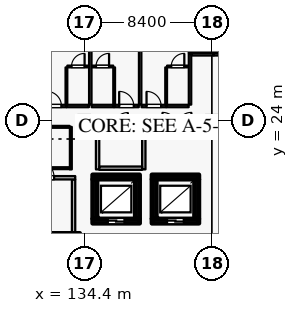
"""IFC4 building model, lengths in metres.
Left out: names, types, materials, properties, quantities, classifications, styles, units other than length and angle.
Written with IfcOpenShell. Run it as: python <this file> out.ifc"""

import sys

from ifc_helpers import new_model, si_unit, direction, frame, frame_2d, origin, origin_2d, place, context, subcontext, project, spatial, rectangle, extrude, element, fill, save


model = new_model("IFC4")
c1 = context("Model", 3, precision=1e-05, world=origin(), true_north=direction((0.0, 1.0)))
c2 = subcontext(c1, "Body", "Model", "MODEL_VIEW")
j1 = project(units=[si_unit("LENGTHUNIT", "METRE"), si_unit("PLANEANGLEUNIT", "RADIAN")], contexts=[c1])
p1 = place(None, origin())
s1 = spatial("IfcSite", under=j1, at=p1, CompositionType="ELEMENT")
p2 = place(p1, origin())
s2 = spatial("IfcBuilding", under=s1, at=p2, CompositionType="ELEMENT")
p3 = place(p2, frame((0.0, 0.0, 39.6)))
s3 = spatial("IfcBuildingStorey", under=s2, at=p3, CompositionType="ELEMENT", Elevation=39.6)
for number, where, z_axis, x_axis in (
    (1, (134.4, 24.0, 0.0), (0.0, 0.0, 1.0), (1.0, 0.0, 0.0)),
    (2, (142.8, 24.0, 0.0), (0.0, 0.0, 1.0), (1.0, 0.0, 0.0)),
):
    element("IfcColumn", number, at=place(p3, frame(where, z_axis=z_axis, x_axis=x_axis)), inside=s3, PredefinedType="COLUMN", context=c2, shape_type="SweptSolid", body=[
        extrude(rectangle(XDim=0.6, YDim=0.6, at=origin_2d()), origin(), (0.0, 0.0, 1.0), 3.6),
    ])
p4 = place(p3, frame((134.95, 17.4, 0.0), z_axis=(0.0, 0.0, 1.0), x_axis=(1.0, 0.0, 0.0)))
e3 = element("IfcWall", 3, at=p4, inside=s3, PredefinedType="SHEAR", context=c2, shape_type="SweptSolid", body=[
    extrude(rectangle(XDim=3.1, YDim=0.3, at=frame_2d((1.55, 0.0))), origin(), (0.0, 0.0, 1.0), 3.335),
])
p5 = place(p4, frame((1.0, 0.0, 0.0)))
e4 = element("IfcOpeningElement", 4, at=p5, cuts=e3, PredefinedType="OPENING", context=c2, shape_type="SweptSolid", body=[
    extrude(rectangle(XDim=1.1, YDim=2.2, at=frame_2d((0.55, 1.1))), frame((0.0, 0.16, 0.0), z_axis=(0.0, -1.0, 0.0), x_axis=(1.0, 0.0, 0.0)), (0.0, 0.0, 1.0), 0.32),
])
p6 = place(p3, frame((137.9, 17.555, 0.0), z_axis=(0.0, 0.0, 1.0), x_axis=(0.0, 1.0, 0.0)))
e5 = element("IfcWall", 5, at=p6, inside=s3, PredefinedType="SHEAR", context=c2, shape_type="SweptSolid", body=[
    extrude(rectangle(XDim=2.59, YDim=0.3, at=frame_2d((1.295, 0.0))), origin(), (0.0, 0.0, 1.0), 3.335),
])
p7 = place(p3, frame((138.05, 20.3, 0.0), z_axis=(0.0, 0.0, 1.0), x_axis=(-1.0, 0.0, 0.0)))
e6 = element("IfcWall", 6, at=p7, inside=s3, PredefinedType="SHEAR", context=c2, shape_type="SweptSolid", body=[
    extrude(rectangle(XDim=3.1, YDim=0.3, at=frame_2d((1.55, 0.0))), origin(), (0.0, 0.0, 1.0), 3.335),
])
p8 = place(p3, frame((135.1, 20.145, 0.0), z_axis=(0.0, 0.0, 1.0), x_axis=(0.0, -1.0, 0.0)))
e7 = element("IfcWall", 7, at=p8, inside=s3, PredefinedType="SHEAR", context=c2, shape_type="SweptSolid", body=[
    extrude(rectangle(XDim=2.59, YDim=0.3, at=frame_2d((1.295, 0.0))), origin(), (0.0, 0.0, 1.0), 3.335),
])
p9 = place(p3, frame((138.85, 17.4, 0.0), z_axis=(0.0, 0.0, 1.0), x_axis=(1.0, 0.0, 0.0)))
e8 = element("IfcWall", 8, at=p9, inside=s3, PredefinedType="SHEAR", context=c2, shape_type="SweptSolid", body=[
    extrude(rectangle(XDim=3.1, YDim=0.3, at=frame_2d((1.55, 0.0))), origin(), (0.0, 0.0, 1.0), 3.335),
])
p10 = place(p9, frame((1.0, 0.0, 0.0)))
e9 = element("IfcOpeningElement", 9, at=p10, cuts=e8, PredefinedType="OPENING", context=c2, shape_type="SweptSolid", body=[
    extrude(rectangle(XDim=1.1, YDim=2.2, at=frame_2d((0.55, 1.1))), frame((0.0, 0.16, 0.0), z_axis=(0.0, -1.0, 0.0), x_axis=(1.0, 0.0, 0.0)), (0.0, 0.0, 1.0), 0.32),
])
p11 = place(p3, frame((141.8, 17.555, 0.0), z_axis=(0.0, 0.0, 1.0), x_axis=(0.0, 1.0, 0.0)))
e10 = element("IfcWall", 10, at=p11, inside=s3, PredefinedType="SHEAR", context=c2, shape_type="SweptSolid", body=[
    extrude(rectangle(XDim=2.59, YDim=0.3, at=frame_2d((1.295, 0.0))), origin(), (0.0, 0.0, 1.0), 3.335),
])
p12 = place(p3, frame((141.95, 20.3, 0.0), z_axis=(0.0, 0.0, 1.0), x_axis=(-1.0, 0.0, 0.0)))
e11 = element("IfcWall", 11, at=p12, inside=s3, PredefinedType="SHEAR", context=c2, shape_type="SweptSolid", body=[
    extrude(rectangle(XDim=3.1, YDim=0.3, at=frame_2d((1.55, 0.0))), origin(), (0.0, 0.0, 1.0), 3.335),
])
p13 = place(p3, frame((139.0, 20.145, 0.0), z_axis=(0.0, 0.0, 1.0), x_axis=(0.0, -1.0, 0.0)))
e12 = element("IfcWall", 12, at=p13, inside=s3, PredefinedType="SHEAR", context=c2, shape_type="SweptSolid", body=[
    extrude(rectangle(XDim=2.59, YDim=0.3, at=frame_2d((1.295, 0.0))), origin(), (0.0, 0.0, 1.0), 3.335),
])
p14 = place(p3, frame((134.11, 16.45, 0.0), z_axis=(0.0, 0.0, 1.0), x_axis=(-1.0, 0.0, 0.0)))
e13 = element("IfcWall", 13, at=p14, inside=s3, PredefinedType="SHEAR", context=c2, shape_type="SweptSolid", body=[
    extrude(rectangle(XDim=4.06, YDim=0.3, at=frame_2d((2.03, 0.0))), origin(), (0.0, 0.0, 1.0), 3.335),
])
p15 = place(p14, frame((1.685, 0.0, 0.0)))
e14 = element("IfcOpeningElement", 14, at=p15, cuts=e13, PredefinedType="OPENING", context=c2, shape_type="SweptSolid", body=[
    extrude(rectangle(XDim=1.25, YDim=2.25, at=frame_2d((0.625, 1.125))), frame((0.0, 0.16, 0.0), z_axis=(0.0, -1.0, 0.0), x_axis=(1.0, 0.0, 0.0)), (0.0, 0.0, 1.0), 0.32),
])
p16 = place(p3, frame((133.7, 16.605, 0.0), z_axis=(0.0, 0.0, 1.0), x_axis=(0.0, 1.0, 0.0)))
e15 = element("IfcWall", 15, at=p16, inside=s3, PredefinedType="PARTITIONING", context=c2, shape_type="SweptSolid", body=[
    extrude(rectangle(XDim=3.53, YDim=0.22, at=frame_2d((1.765, 0.0))), origin(), (0.0, 0.0, 1.0), 3.335),
])
p17 = place(p3, frame((129.79, 20.25, 0.0), z_axis=(0.0, 0.0, 1.0), x_axis=(1.0, 0.0, 0.0)))
e16 = element("IfcWall", 16, at=p17, inside=s3, PredefinedType="PARTITIONING", context=c2, shape_type="SweptSolid", body=[
    extrude(rectangle(XDim=4.02, YDim=0.22, at=frame_2d((2.01, 0.0))), origin(), (0.0, 0.0, 1.0), 3.335),
])
p18 = place(p17, frame((1.39, 0.0, 0.0)))
e17 = element("IfcOpeningElement", 17, at=p18, cuts=e16, PredefinedType="OPENING", context=c2, shape_type="SweptSolid", body=[
    extrude(rectangle(XDim=1.24, YDim=2.2, at=frame_2d((0.62, 1.1))), frame((0.0, 0.12, 0.0), z_axis=(0.0, -1.0, 0.0), x_axis=(1.0, 0.0, 0.0)), (0.0, 0.0, 1.0), 0.24),
])
p19 = place(p3, frame((131.61, 24.97, 0.0), z_axis=(0.0, 0.0, 1.0), x_axis=(1.0, 0.0, 0.0)))
e18 = element("IfcWall", 18, at=p19, inside=s3, PredefinedType="PARTITIONING", context=c2, shape_type="SweptSolid", body=[
    extrude(rectangle(XDim=1.62, YDim=0.16, at=frame_2d((0.81, 0.0))), origin(), (0.0, 0.0, 1.0), 3.335),
])
p20 = place(p19, frame((0.33, 0.0, 0.0)))
e19 = element("IfcOpeningElement", 19, at=p20, cuts=e18, PredefinedType="OPENING", context=c2, shape_type="SweptSolid", body=[
    extrude(rectangle(XDim=0.96, YDim=2.2, at=frame_2d((0.48, 1.1))), frame((0.0, 0.09, 0.0), z_axis=(0.0, -1.0, 0.0), x_axis=(1.0, 0.0, 0.0)), (0.0, 0.0, 1.0), 0.18),
])
p21 = place(p3, frame((133.24, 24.97, 0.0), z_axis=(0.0, 0.0, 1.0), x_axis=(1.0, 0.0, 0.0)))
e20 = element("IfcWall", 20, at=p21, inside=s3, PredefinedType="PARTITIONING", context=c2, shape_type="SweptSolid", body=[
    extrude(rectangle(XDim=1.47, YDim=0.16, at=frame_2d((0.735, 0.0))), origin(), (0.0, 0.0, 1.0), 3.335),
])
p22 = place(p3, frame((133.23, 25.06, 0.0), z_axis=(0.0, 0.0, 1.0), x_axis=(0.0, 1.0, 0.0)))
e21 = element("IfcWall", 21, at=p22, inside=s3, PredefinedType="PARTITIONING", context=c2, shape_type="SweptSolid", body=[
    extrude(rectangle(XDim=2.45, YDim=0.115, at=frame_2d((1.225, 0.0))), origin(), (0.0, 0.0, 1.0), 3.335),
])
p23 = place(p3, frame((133.29, 27.57, 0.0), z_axis=(0.0, 0.0, 1.0), x_axis=(1.0, 0.0, 0.0)))
e22 = element("IfcWall", 22, at=p23, inside=s3, PredefinedType="PARTITIONING", context=c2, shape_type="SweptSolid", body=[
    extrude(rectangle(XDim=1.41, YDim=0.115, at=frame_2d((0.705, 0.0))), origin(), (0.0, 0.0, 1.0), 3.335),
])
p24 = place(p23, frame((0.275, 0.0, 0.0)))
e23 = element("IfcOpeningElement", 23, at=p24, cuts=e22, PredefinedType="OPENING", context=c2, shape_type="SweptSolid", body=[
    extrude(rectangle(XDim=0.86, YDim=2.12, at=frame_2d((0.43, 1.06))), frame((0.0, 0.067, 0.0), z_axis=(0.0, -1.0, 0.0), x_axis=(1.0, 0.0, 0.0)), (0.0, 0.0, 1.0), 0.135),
])
p25 = place(p3, frame((134.89, 24.97, 0.0), z_axis=(0.0, 0.0, 1.0), x_axis=(1.0, 0.0, 0.0)))
e24 = element("IfcWall", 24, at=p25, inside=s3, PredefinedType="PARTITIONING", context=c2, shape_type="SweptSolid", body=[
    extrude(rectangle(XDim=1.47, YDim=0.16, at=frame_2d((0.735, 0.0))), origin(), (0.0, 0.0, 1.0), 3.335),
])
p26 = place(p3, frame((136.37, 24.97, 0.0), z_axis=(0.0, 0.0, 1.0), x_axis=(1.0, 0.0, 0.0)))
e25 = element("IfcWall", 25, at=p26, inside=s3, PredefinedType="PARTITIONING", context=c2, shape_type="SweptSolid", body=[
    extrude(rectangle(XDim=1.62, YDim=0.16, at=frame_2d((0.81, 0.0))), origin(), (0.0, 0.0, 1.0), 3.335),
])
p27 = place(p26, frame((0.33, 0.0, 0.0)))
e26 = element("IfcOpeningElement", 26, at=p27, cuts=e25, PredefinedType="OPENING", context=c2, shape_type="SweptSolid", body=[
    extrude(rectangle(XDim=0.96, YDim=2.2, at=frame_2d((0.48, 1.1))), frame((0.0, 0.09, 0.0), z_axis=(0.0, -1.0, 0.0), x_axis=(1.0, 0.0, 0.0)), (0.0, 0.0, 1.0), 0.18),
])
p28 = place(p3, frame((136.37, 25.06, 0.0), z_axis=(0.0, 0.0, 1.0), x_axis=(0.0, 1.0, 0.0)))
e27 = element("IfcWall", 27, at=p28, inside=s3, PredefinedType="PARTITIONING", context=c2, shape_type="SweptSolid", body=[
    extrude(rectangle(XDim=2.45, YDim=0.115, at=frame_2d((1.225, 0.0))), origin(), (0.0, 0.0, 1.0), 3.335),
])
p29 = place(p3, frame((134.9, 27.57, 0.0), z_axis=(0.0, 0.0, 1.0), x_axis=(1.0, 0.0, 0.0)))
e28 = element("IfcWall", 28, at=p29, inside=s3, PredefinedType="PARTITIONING", context=c2, shape_type="SweptSolid", body=[
    extrude(rectangle(XDim=1.41, YDim=0.115, at=frame_2d((0.705, 0.0))), origin(), (0.0, 0.0, 1.0), 3.335),
])
p30 = place(p29, frame((0.275, 0.0, 0.0)))
e29 = element("IfcOpeningElement", 29, at=p30, cuts=e28, PredefinedType="OPENING", context=c2, shape_type="SweptSolid", body=[
    extrude(rectangle(XDim=0.86, YDim=2.12, at=frame_2d((0.43, 1.06))), frame((0.0, 0.067, 0.0), z_axis=(0.0, -1.0, 0.0), x_axis=(1.0, 0.0, 0.0)), (0.0, 0.0, 1.0), 0.135),
])
p31 = place(p3, frame((134.8, 25.06, 0.0), z_axis=(0.0, 0.0, 1.0), x_axis=(0.0, 1.0, 0.0)))
e30 = element("IfcWall", 30, at=p31, inside=s3, PredefinedType="PARTITIONING", context=c2, shape_type="SweptSolid", body=[
    extrude(rectangle(XDim=6.6, YDim=0.16, at=frame_2d((3.3, 0.0))), origin(), (0.0, 0.0, 1.0), 3.335),
])
p32 = place(p3, frame((138.17, 24.97, 0.0), z_axis=(0.0, 0.0, 1.0), x_axis=(1.0, 0.0, 0.0)))
e31 = element("IfcWall", 31, at=p32, inside=s3, PredefinedType="PARTITIONING", context=c2, shape_type="SweptSolid", body=[
    extrude(rectangle(XDim=1.62, YDim=0.16, at=frame_2d((0.81, 0.0))), origin(), (0.0, 0.0, 1.0), 3.335),
])
p33 = place(p32, frame((0.33, 0.0, 0.0)))
e32 = element("IfcOpeningElement", 32, at=p33, cuts=e31, PredefinedType="OPENING", context=c2, shape_type="SweptSolid", body=[
    extrude(rectangle(XDim=0.96, YDim=2.2, at=frame_2d((0.48, 1.1))), frame((0.0, 0.09, 0.0), z_axis=(0.0, -1.0, 0.0), x_axis=(1.0, 0.0, 0.0)), (0.0, 0.0, 1.0), 0.18),
])
p34 = place(p3, frame((139.8, 24.97, 0.0), z_axis=(0.0, 0.0, 1.0), x_axis=(1.0, 0.0, 0.0)))
e33 = element("IfcWall", 33, at=p34, inside=s3, PredefinedType="PARTITIONING", context=c2, shape_type="SweptSolid", body=[
    extrude(rectangle(XDim=1.47, YDim=0.16, at=frame_2d((0.735, 0.0))), origin(), (0.0, 0.0, 1.0), 3.335),
])
p35 = place(p3, frame((139.79, 25.06, 0.0), z_axis=(0.0, 0.0, 1.0), x_axis=(0.0, 1.0, 0.0)))
e34 = element("IfcWall", 34, at=p35, inside=s3, PredefinedType="PARTITIONING", context=c2, shape_type="SweptSolid", body=[
    extrude(rectangle(XDim=2.45, YDim=0.115, at=frame_2d((1.225, 0.0))), origin(), (0.0, 0.0, 1.0), 3.335),
])
p36 = place(p3, frame((139.85, 27.57, 0.0), z_axis=(0.0, 0.0, 1.0), x_axis=(1.0, 0.0, 0.0)))
e35 = element("IfcWall", 35, at=p36, inside=s3, PredefinedType="PARTITIONING", context=c2, shape_type="SweptSolid", body=[
    extrude(rectangle(XDim=1.41, YDim=0.115, at=frame_2d((0.705, 0.0))), origin(), (0.0, 0.0, 1.0), 3.335),
])
p37 = place(p36, frame((0.275, 0.0, 0.0)))
e36 = element("IfcOpeningElement", 36, at=p37, cuts=e35, PredefinedType="OPENING", context=c2, shape_type="SweptSolid", body=[
    extrude(rectangle(XDim=0.86, YDim=2.12, at=frame_2d((0.43, 1.06))), frame((0.0, 0.067, 0.0), z_axis=(0.0, -1.0, 0.0), x_axis=(1.0, 0.0, 0.0)), (0.0, 0.0, 1.0), 0.135),
])
p38 = place(p3, frame((138.08, 25.06, 0.0), z_axis=(0.0, 0.0, 1.0), x_axis=(0.0, 1.0, 0.0)))
e37 = element("IfcWall", 37, at=p38, inside=s3, PredefinedType="PARTITIONING", context=c2, shape_type="SweptSolid", body=[
    extrude(rectangle(XDim=6.6, YDim=0.16, at=frame_2d((3.3, 0.0))), origin(), (0.0, 0.0, 1.0), 3.335),
])
p39 = place(p3, frame((141.36, 25.06, 0.0), z_axis=(0.0, 0.0, 1.0), x_axis=(0.0, 1.0, 0.0)))
e38 = element("IfcWall", 38, at=p39, inside=s3, PredefinedType="PARTITIONING", context=c2, shape_type="SweptSolid", body=[
    extrude(rectangle(XDim=3.39, YDim=0.16, at=frame_2d((1.695, 0.0))), origin(), (0.0, 0.0, 1.0), 3.335),
])
p40 = place(p3, frame((141.45, 28.37, 0.0), z_axis=(0.0, 0.0, 1.0), x_axis=(1.0, 0.0, 0.0)))
e39 = element("IfcWall", 39, at=p40, inside=s3, PredefinedType="PARTITIONING", context=c2, shape_type="SweptSolid", body=[
    extrude(rectangle(XDim=1.47, YDim=0.16, at=frame_2d((0.735, 0.0))), origin(), (0.0, 0.0, 1.0), 3.335),
])
p41 = place(p3, frame((142.93, 28.37, 0.0), z_axis=(0.0, 0.0, 1.0), x_axis=(1.0, 0.0, 0.0)))
e40 = element("IfcWall", 40, at=p41, inside=s3, PredefinedType="PARTITIONING", context=c2, shape_type="SweptSolid", body=[
    extrude(rectangle(XDim=1.62, YDim=0.16, at=frame_2d((0.81, 0.0))), origin(), (0.0, 0.0, 1.0), 3.335),
])
p42 = place(p41, frame((0.33, 0.0, 0.0)))
e41 = element("IfcOpeningElement", 41, at=p42, cuts=e40, PredefinedType="OPENING", context=c2, shape_type="SweptSolid", body=[
    extrude(rectangle(XDim=0.96, YDim=2.2, at=frame_2d((0.48, 1.1))), frame((0.0, 0.09, 0.0), z_axis=(0.0, -1.0, 0.0), x_axis=(1.0, 0.0, 0.0)), (0.0, 0.0, 1.0), 0.18),
])
p43 = place(p3, frame((142.93, 28.46, 0.0), z_axis=(0.0, 0.0, 1.0), x_axis=(0.0, 1.0, 0.0)))
e42 = element("IfcWall", 42, at=p43, inside=s3, PredefinedType="PARTITIONING", context=c2, shape_type="SweptSolid", body=[
    extrude(rectangle(XDim=1.74, YDim=0.115, at=frame_2d((0.87, 0.0))), origin(), (0.0, 0.0, 1.0), 2.74),
])
p44 = place(p3, frame((141.36, 28.46, 0.0), z_axis=(0.0, 0.0, 1.0), x_axis=(0.0, 1.0, 0.0)))
e43 = element("IfcWall", 43, at=p44, inside=s3, PredefinedType="PARTITIONING", context=c2, shape_type="SweptSolid", body=[
    extrude(rectangle(XDim=3.2, YDim=0.16, at=frame_2d((1.6, 0.0))), origin(), (0.0, 0.0, 1.0), 3.335),
])
p45 = place(p3, frame((138.96, 23.6, 0.0), z_axis=(0.0, 0.0, 1.0), x_axis=(1.0, 0.0, 0.0)))
e44 = element("IfcWall", 44, at=p45, inside=s3, PredefinedType="PARTITIONING", context=c2, shape_type="SweptSolid", body=[
    extrude(rectangle(XDim=3.08, YDim=0.14, at=frame_2d((1.54, 0.0))), origin(), (0.0, 0.0, 1.0), 3.335),
])
p46 = place(p45, frame((0.59, 0.0, 0.0)))
e45 = element("IfcOpeningElement", 45, at=p46, cuts=e44, PredefinedType="OPENING", context=c2, shape_type="SweptSolid", body=[
    extrude(rectangle(XDim=1.9, YDim=2.4, at=frame_2d((0.95, 1.2))), frame((0.0, 0.08, 0.0), z_axis=(0.0, -1.0, 0.0), x_axis=(1.0, 0.0, 0.0)), (0.0, 0.0, 1.0), 0.16),
])
p47 = place(p3, frame((135.36, 23.6, 0.0), z_axis=(0.0, 0.0, 1.0), x_axis=(1.0, 0.0, 0.0)))
e46 = element("IfcWall", 46, at=p47, inside=s3, PredefinedType="PARTITIONING", context=c2, shape_type="SweptSolid", body=[
    extrude(rectangle(XDim=2.88, YDim=0.22, at=frame_2d((1.44, 0.0))), origin(), (0.0, 0.0, 1.0), 3.335),
])
p48 = place(p47, frame((0.97, 0.0, 0.0)))
e47 = element("IfcOpeningElement", 47, at=p48, cuts=e46, PredefinedType="OPENING", context=c2, shape_type="SweptSolid", body=[
    extrude(rectangle(XDim=0.94, YDim=2.15, at=frame_2d((0.47, 1.075))), frame((0.0, 0.12, 0.0), z_axis=(0.0, -1.0, 0.0), x_axis=(1.0, 0.0, 0.0)), (0.0, 0.0, 1.0), 0.24),
])
p49 = place(p3, frame((126.76, 23.6, 0.0), z_axis=(0.0, 0.0, 1.0), x_axis=(1.0, 0.0, 0.0)))
e48 = element("IfcWall", 48, at=p49, inside=s3, PredefinedType="PARTITIONING", context=c2, shape_type="SweptSolid", body=[
    extrude(rectangle(XDim=6.68, YDim=0.125, at=frame_2d((3.34, 0.0))), origin(), (0.0, 0.0, 1.0), 3.335),
])
p50 = place(p49, frame((2.85, 0.0, 0.0)))
e49 = element("IfcOpeningElement", 49, at=p50, cuts=e48, PredefinedType="OPENING", context=c2, shape_type="SweptSolid", body=[
    extrude(rectangle(XDim=0.98, YDim=2.15, at=frame_2d((0.49, 1.075))), frame((0.0, 0.073, 0.0), z_axis=(0.0, -1.0, 0.0), x_axis=(1.0, 0.0, 0.0)), (0.0, 0.0, 1.0), 0.145),
])
for number, where, z_axis, x_axis in (
    (50, (135.28, 20.8, 0.0), (0.0, 0.0, 1.0), (0.0, 1.0, 0.0)),
    (51, (138.32, 20.8, 0.0), (0.0, 0.0, 1.0), (0.0, 1.0, 0.0)),
):
    element("IfcWall", number, at=place(p3, frame(where, z_axis=z_axis, x_axis=x_axis)), inside=s3, PredefinedType="PARTITIONING", context=c2, shape_type="SweptSolid", body=[
        extrude(rectangle(XDim=2.748, YDim=0.22, at=frame_2d((1.374, 0.0))), origin(), (0.0, 0.0, 1.0), 3.335),
    ])
p51 = place(p3, frame((135.39, 20.88, 0.0), z_axis=(0.0, 0.0, 1.0), x_axis=(1.0, 0.0, 0.0)))
e52 = element("IfcWall", 52, at=p51, inside=s3, PredefinedType="PARTITIONING", context=c2, shape_type="SweptSolid", body=[
    extrude(rectangle(XDim=2.82, YDim=0.22, at=frame_2d((1.41, 0.0))), origin(), (0.0, 0.0, 1.0), 3.335),
])
p52 = place(p3, frame((133.52, 20.8, 0.0), z_axis=(0.0, 0.0, 1.0), x_axis=(0.0, 1.0, 0.0)))
e53 = element("IfcWall", 53, at=p52, inside=s3, PredefinedType="PARTITIONING", context=c2, shape_type="SweptSolid", body=[
    extrude(rectangle(XDim=2.796, YDim=0.125, at=frame_2d((1.398, 0.0))), origin(), (0.0, 0.0, 1.0), 3.335),
])
p53 = place(p3, frame((126.742, 20.88, 0.0), z_axis=(0.0, 0.0, 1.0), x_axis=(1.0, 0.0, 0.0)))
e54 = element("IfcWall", 54, at=p53, inside=s3, PredefinedType="PARTITIONING", context=c2, shape_type="SweptSolid", body=[
    extrude(rectangle(XDim=6.715, YDim=0.125, at=frame_2d((3.357, 0.0))), origin(), (0.0, 0.0, 1.0), 3.335),
])
p54 = place(p5, origin())
e55 = element("IfcDoor", 55, at=p54, inside=s3, OperationType="DOUBLE_DOOR_SLIDING", PredefinedType="DOOR", context=c2, shape_type="SweptSolid", body=[
    extrude(rectangle(XDim=1.1, YDim=2.2, at=frame_2d((0.55, 1.1))), frame((0.0, 0.025, 0.0), z_axis=(0.0, -1.0, 0.0), x_axis=(1.0, 0.0, 0.0)), (0.0, 0.0, 1.0), 0.05),
])
fill(e4, e55)
p55 = place(p10, origin())
e56 = element("IfcDoor", 56, at=p55, inside=s3, OperationType="DOUBLE_DOOR_SLIDING", PredefinedType="DOOR", context=c2, shape_type="SweptSolid", body=[
    extrude(rectangle(XDim=1.1, YDim=2.2, at=frame_2d((0.55, 1.1))), frame((0.0, 0.025, 0.0), z_axis=(0.0, -1.0, 0.0), x_axis=(1.0, 0.0, 0.0)), (0.0, 0.0, 1.0), 0.05),
])
fill(e9, e56)
p56 = place(p18, origin())
e57 = element("IfcDoor", 57, at=p56, inside=s3, OperationType="SINGLE_SWING_LEFT", PredefinedType="DOOR", context=c2, shape_type="SweptSolid", body=[
    extrude(rectangle(XDim=1.24, YDim=2.2, at=frame_2d((0.62, 1.1))), frame((0.0, 0.025, 0.0), z_axis=(0.0, -1.0, 0.0), x_axis=(1.0, 0.0, 0.0)), (0.0, 0.0, 1.0), 0.05),
])
fill(e17, e57)
p57 = place(p20, origin())
e58 = element("IfcDoor", 58, at=p57, inside=s3, OperationType="SINGLE_SWING_LEFT", PredefinedType="DOOR", context=c2, shape_type="SweptSolid", body=[
    extrude(rectangle(XDim=0.96, YDim=2.2, at=frame_2d((0.48, 1.1))), frame((0.0, 0.025, 0.0), z_axis=(0.0, -1.0, 0.0), x_axis=(1.0, 0.0, 0.0)), (0.0, 0.0, 1.0), 0.05),
])
fill(e19, e58)
p58 = place(p24, origin())
e59 = element("IfcDoor", 59, at=p58, inside=s3, OperationType="SINGLE_SWING_RIGHT", PredefinedType="DOOR", context=c2, shape_type="SweptSolid", body=[
    extrude(rectangle(XDim=0.86, YDim=2.12, at=frame_2d((0.43, 1.06))), frame((0.0, 0.025, 0.0), z_axis=(0.0, -1.0, 0.0), x_axis=(1.0, 0.0, 0.0)), (0.0, 0.0, 1.0), 0.05),
])
fill(e23, e59)
p59 = place(p27, origin())
e60 = element("IfcDoor", 60, at=p59, inside=s3, OperationType="SINGLE_SWING_LEFT", PredefinedType="DOOR", context=c2, shape_type="SweptSolid", body=[
    extrude(rectangle(XDim=0.96, YDim=2.2, at=frame_2d((0.48, 1.1))), frame((0.0, 0.025, 0.0), z_axis=(0.0, -1.0, 0.0), x_axis=(1.0, 0.0, 0.0)), (0.0, 0.0, 1.0), 0.05),
])
fill(e26, e60)
p60 = place(p30, origin())
e61 = element("IfcDoor", 61, at=p60, inside=s3, OperationType="SINGLE_SWING_RIGHT", PredefinedType="DOOR", context=c2, shape_type="SweptSolid", body=[
    extrude(rectangle(XDim=0.86, YDim=2.12, at=frame_2d((0.43, 1.06))), frame((0.0, 0.025, 0.0), z_axis=(0.0, -1.0, 0.0), x_axis=(1.0, 0.0, 0.0)), (0.0, 0.0, 1.0), 0.05),
])
fill(e29, e61)
p61 = place(p33, origin())
e62 = element("IfcDoor", 62, at=p61, inside=s3, OperationType="SINGLE_SWING_LEFT", PredefinedType="DOOR", context=c2, shape_type="SweptSolid", body=[
    extrude(rectangle(XDim=0.96, YDim=2.2, at=frame_2d((0.48, 1.1))), frame((0.0, 0.025, 0.0), z_axis=(0.0, -1.0, 0.0), x_axis=(1.0, 0.0, 0.0)), (0.0, 0.0, 1.0), 0.05),
])
fill(e32, e62)
p62 = place(p37, origin())
e63 = element("IfcDoor", 63, at=p62, inside=s3, OperationType="SINGLE_SWING_RIGHT", PredefinedType="DOOR", context=c2, shape_type="SweptSolid", body=[
    extrude(rectangle(XDim=0.86, YDim=2.12, at=frame_2d((0.43, 1.06))), frame((0.0, 0.025, 0.0), z_axis=(0.0, -1.0, 0.0), x_axis=(1.0, 0.0, 0.0)), (0.0, 0.0, 1.0), 0.05),
])
fill(e36, e63)
p63 = place(p46, origin())
e64 = element("IfcDoor", 64, at=p63, inside=s3, OperationType="DOUBLE_DOOR_SINGLE_SWING", PredefinedType="DOOR", context=c2, shape_type="SweptSolid", body=[
    extrude(rectangle(XDim=1.9, YDim=2.4, at=frame_2d((0.95, 1.2))), frame((0.0, 0.025, 0.0), z_axis=(0.0, -1.0, 0.0), x_axis=(1.0, 0.0, 0.0)), (0.0, 0.0, 1.0), 0.05),
])
fill(e45, e64)
p64 = place(p48, origin())
e65 = element("IfcDoor", 65, at=p64, inside=s3, OperationType="SINGLE_SWING_RIGHT", PredefinedType="DOOR", context=c2, shape_type="SweptSolid", body=[
    extrude(rectangle(XDim=0.94, YDim=2.15, at=frame_2d((0.47, 1.075))), frame((0.0, 0.025, 0.0), z_axis=(0.0, -1.0, 0.0), x_axis=(1.0, 0.0, 0.0)), (0.0, 0.0, 1.0), 0.05),
])
fill(e47, e65)
save(model, sys.argv[1])
